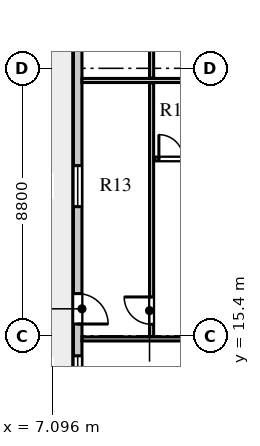
"""IFC4 building model, lengths in metres.
Left out: names, types, materials, properties, quantities, classifications, styles, units other than length and angle.
Written with IfcOpenShell. Run it as: python <this file> out.ifc"""

import sys

from ifc_helpers import new_model, si_unit, direction, frame, frame_2d, origin, place, context, subcontext, project, spatial, rectangle, extrude, element, fill, save


model = new_model("IFC4")
c1 = context("Model", 3, precision=1e-05, world=origin(), true_north=direction((0.0, 1.0)))
c2 = subcontext(c1, "Body", "Model", "MODEL_VIEW")
j1 = project(units=[si_unit("LENGTHUNIT", "METRE"), si_unit("PLANEANGLEUNIT", "RADIAN")], contexts=[c1])
p1 = place(None, origin())
s1 = spatial("IfcSite", under=j1, at=p1, CompositionType="ELEMENT")
p2 = place(p1, origin())
s2 = spatial("IfcBuilding", under=s1, at=p2, CompositionType="ELEMENT")
p3 = place(p2, frame((0.0, 0.0, 229.7)))
s3 = spatial("IfcBuildingStorey", under=s2, at=p3, CompositionType="ELEMENT", Elevation=229.7)
p4 = place(p3, frame((7.94, 44.07, 0.0), z_axis=(0.0, 0.0, 1.0), x_axis=(0.0, -1.0, 0.0)))
e1 = element("IfcWall", 1, at=p4, inside=s3, PredefinedType="STANDARD", context=c2, shape_type="SweptSolid", body=[
    extrude(rectangle(XDim=30.94, YDim=0.28, at=frame_2d((15.47, 0.0))), origin(), (0.0, 0.0, 1.0), 3.66),
])
p5 = place(p4, frame((29.325, 0.0, 0.8)))
e2 = element("IfcOpeningElement", 2, at=p5, cuts=e1, PredefinedType="OPENING", context=c2, shape_type="SweptSolid", body=[
    extrude(rectangle(XDim=0.95, YDim=1.65, at=frame_2d((0.475, 0.825))), frame((0.0, 0.15, 0.0), z_axis=(0.0, -1.0, 0.0), x_axis=(1.0, 0.0, 0.0)), (0.0, 0.0, 1.0), 0.3),
])
p6 = place(p4, frame((27.28, 0.0, 0.0)))
e3 = element("IfcOpeningElement", 3, at=p6, cuts=e1, PredefinedType="OPENING", context=c2, shape_type="SweptSolid", body=[
    extrude(rectangle(XDim=1.0, YDim=2.05, at=frame_2d((0.5, 1.025))), frame((0.0, 0.15, 0.0), z_axis=(0.0, -1.0, 0.0), x_axis=(1.0, 0.0, 0.0)), (0.0, 0.0, 1.0), 0.3),
])
p7 = place(p4, frame((23.07, 0.0, 0.8)))
e4 = element("IfcOpeningElement", 4, at=p7, cuts=e1, PredefinedType="OPENING", context=c2, shape_type="SweptSolid", body=[
    extrude(rectangle(XDim=1.35, YDim=1.9, at=frame_2d((0.675, 0.95))), frame((0.0, 0.15, 0.0), z_axis=(0.0, -1.0, 0.0), x_axis=(1.0, 0.0, 0.0)), (0.0, 0.0, 1.0), 0.3),
])
p8 = place(p4, frame((17.045, 0.0, 0.8)))
e5 = element("IfcOpeningElement", 5, at=p8, cuts=e1, PredefinedType="OPENING", context=c2, shape_type="SweptSolid", body=[
    extrude(rectangle(XDim=1.65, YDim=1.95, at=frame_2d((0.825, 0.975))), frame((0.0, 0.15, 0.0), z_axis=(0.0, -1.0, 0.0), x_axis=(1.0, 0.0, 0.0)), (0.0, 0.0, 1.0), 0.3),
])
p9 = place(p4, frame((12.095, 0.0, 0.8)))
e6 = element("IfcOpeningElement", 6, at=p9, cuts=e1, PredefinedType="OPENING", context=c2, shape_type="SweptSolid", body=[
    extrude(rectangle(XDim=1.95, YDim=2.0, at=frame_2d((0.975, 1.0))), frame((0.0, 0.15, 0.0), z_axis=(0.0, -1.0, 0.0), x_axis=(1.0, 0.0, 0.0)), (0.0, 0.0, 1.0), 0.3),
])
p10 = place(p4, frame((5.295, 0.0, 0.8)))
e7 = element("IfcOpeningElement", 7, at=p10, cuts=e1, PredefinedType="OPENING", context=c2, shape_type="SweptSolid", body=[
    extrude(rectangle(XDim=2.25, YDim=2.0, at=frame_2d((1.125, 1.0))), frame((0.0, 0.15, 0.0), z_axis=(0.0, -1.0, 0.0), x_axis=(1.0, 0.0, 0.0)), (0.0, 0.0, 1.0), 0.3),
])
p11 = place(p4, frame((0.665, 0.0, 0.8)))
e8 = element("IfcOpeningElement", 8, at=p11, cuts=e1, PredefinedType="OPENING", context=c2, shape_type="SweptSolid", body=[
    extrude(rectangle(XDim=0.95, YDim=1.65, at=frame_2d((0.475, 0.825))), frame((0.0, 0.15, 0.0), z_axis=(0.0, -1.0, 0.0), x_axis=(1.0, 0.0, 0.0)), (0.0, 0.0, 1.0), 0.3),
])
p12 = place(p3, frame((8.08, 15.3, 0.0), z_axis=(0.0, 0.0, 1.0), x_axis=(1.0, 0.0, 0.0)))
e9 = element("IfcWall", 9, at=p12, inside=s3, PredefinedType="PARTITIONING", context=c2, shape_type="SweptSolid", body=[
    extrude(rectangle(XDim=5.62, YDim=0.135, at=frame_2d((2.81, 0.0))), origin(), (0.0, 0.0, 1.0), 3.21),
])
p13 = place(p3, frame((10.37, 15.38, 0.0), z_axis=(0.0, 0.0, 1.0), x_axis=(0.0, 1.0, 0.0)))
e10 = element("IfcWall", 10, at=p13, inside=s3, PredefinedType="PARTITIONING", context=c2, shape_type="SweptSolid", body=[
    extrude(rectangle(XDim=8.34, YDim=0.135, at=frame_2d((4.17, 0.0))), origin(), (0.0, 0.0, 1.0), 3.66),
])
p14 = place(p13, frame((0.4, 0.0, 0.0)))
e11 = element("IfcOpeningElement", 11, at=p14, cuts=e10, PredefinedType="OPENING", context=c2, shape_type="SweptSolid", body=[
    extrude(rectangle(XDim=0.9, YDim=2.08, at=frame_2d((0.45, 1.04))), frame((0.0, 0.078, 0.0), z_axis=(0.0, -1.0, 0.0), x_axis=(1.0, 0.0, 0.0)), (0.0, 0.0, 1.0), 0.155),
])
p15 = place(p3, frame((10.45, 21.218, 0.0), z_axis=(0.0, 0.0, 1.0), x_axis=(1.0, 0.0, 0.0)))
e12 = element("IfcWall", 12, at=p15, inside=s3, PredefinedType="PLUMBINGWALL", context=c2, shape_type="SweptSolid", body=[
    extrude(rectangle(XDim=3.17, YDim=0.125, at=frame_2d((1.585, 0.0))), origin(), (0.0, 0.0, 1.0), 3.66),
])
p16 = place(p15, frame((0.16, 0.0, 0.0)))
e13 = element("IfcOpeningElement", 13, at=p16, cuts=e12, PredefinedType="OPENING", context=c2, shape_type="SweptSolid", body=[
    extrude(rectangle(XDim=0.8, YDim=2.05, at=frame_2d((0.4, 1.025))), frame((0.0, 0.073, 0.0), z_axis=(0.0, -1.0, 0.0), x_axis=(1.0, 0.0, 0.0)), (0.0, 0.0, 1.0), 0.145),
])
p17 = place(p15, frame((1.782, 0.0, 0.0)))
e14 = element("IfcOpeningElement", 14, at=p17, cuts=e12, PredefinedType="OPENING", context=c2, shape_type="SweptSolid", body=[
    extrude(rectangle(XDim=0.8, YDim=2.05, at=frame_2d((0.4, 1.025))), frame((0.0, 0.073, 0.0), z_axis=(0.0, -1.0, 0.0), x_axis=(1.0, 0.0, 0.0)), (0.0, 0.0, 1.0), 0.145),
])
p18 = place(p3, frame((8.08, 23.8, 0.0), z_axis=(0.0, 0.0, 1.0), x_axis=(1.0, 0.0, 0.0)))
e15 = element("IfcWall", 15, at=p18, inside=s3, PredefinedType="PARTITIONING", context=c2, shape_type="SweptSolid", body=[
    extrude(rectangle(XDim=5.56, YDim=0.135, at=frame_2d((2.78, 0.0))), origin(), (0.0, 0.0, 1.0), 3.66),
])
p19 = place(p3, frame((10.37, 23.88, 0.0), z_axis=(0.0, 0.0, 1.0), x_axis=(0.0, 1.0, 0.0)))
e16 = element("IfcWall", 16, at=p19, inside=s3, PredefinedType="PARTITIONING", context=c2, shape_type="SweptSolid", body=[
    extrude(rectangle(XDim=9.44, YDim=0.135, at=frame_2d((4.72, 0.0))), origin(), (0.0, 0.0, 1.0), 3.66),
])
p20 = place(p19, frame((3.67, 0.0, 0.0)))
e17 = element("IfcOpeningElement", 17, at=p20, cuts=e16, PredefinedType="OPENING", context=c2, shape_type="SweptSolid", body=[
    extrude(rectangle(XDim=0.85, YDim=2.08, at=frame_2d((0.425, 1.04))), frame((0.0, 0.078, 0.0), z_axis=(0.0, -1.0, 0.0), x_axis=(1.0, 0.0, 0.0)), (0.0, 0.0, 1.0), 0.155),
])
p21 = place(p19, frame((4.97, 0.0, 0.0)))
e18 = element("IfcOpeningElement", 18, at=p21, cuts=e16, PredefinedType="OPENING", context=c2, shape_type="SweptSolid", body=[
    extrude(rectangle(XDim=0.85, YDim=2.08, at=frame_2d((0.425, 1.04))), frame((0.0, 0.078, 0.0), z_axis=(0.0, -1.0, 0.0), x_axis=(1.0, 0.0, 0.0)), (0.0, 0.0, 1.0), 0.155),
])
p22 = place(p5, origin())
e19 = element("IfcWindow", 19, at=p22, inside=s3, PartitioningType="SINGLE_PANEL", PredefinedType="WINDOW", context=c2, shape_type="SweptSolid", body=[
    extrude(rectangle(XDim=0.95, YDim=1.65, at=frame_2d((0.475, 0.825))), frame((0.0, 0.03, 0.0), z_axis=(0.0, -1.0, 0.0), x_axis=(1.0, 0.0, 0.0)), (0.0, 0.0, 1.0), 0.06),
])
fill(e2, e19)
p23 = place(p6, frame((1.0, 0.0, 0.0), z_axis=(0.0, 0.0, 1.0), x_axis=(-1.0, 0.0, 0.0)))
e20 = element("IfcDoor", 20, at=p23, inside=s3, OperationType="SINGLE_SWING_LEFT", PredefinedType="DOOR", context=c2, shape_type="SweptSolid", body=[
    extrude(rectangle(XDim=1.0, YDim=2.05, at=frame_2d((0.5, 1.025))), frame((0.0, 0.025, 0.0), z_axis=(0.0, -1.0, 0.0), x_axis=(1.0, 0.0, 0.0)), (0.0, 0.0, 1.0), 0.05),
])
fill(e3, e20)
p24 = place(p7, origin())
e21 = element("IfcWindow", 21, at=p24, inside=s3, PartitioningType="SINGLE_PANEL", PredefinedType="WINDOW", context=c2, shape_type="SweptSolid", body=[
    extrude(rectangle(XDim=1.35, YDim=1.9, at=frame_2d((0.675, 0.95))), frame((0.0, 0.03, 0.0), z_axis=(0.0, -1.0, 0.0), x_axis=(1.0, 0.0, 0.0)), (0.0, 0.0, 1.0), 0.06),
])
fill(e4, e21)
p25 = place(p16, origin())
e22 = element("IfcDoor", 22, at=p25, inside=s3, OperationType="SINGLE_SWING_LEFT", PredefinedType="DOOR", context=c2, shape_type="SweptSolid", body=[
    extrude(rectangle(XDim=0.8, YDim=2.05, at=frame_2d((0.4, 1.025))), frame((0.0, 0.025, 0.0), z_axis=(0.0, -1.0, 0.0), x_axis=(1.0, 0.0, 0.0)), (0.0, 0.0, 1.0), 0.05),
])
fill(e13, e22)
p26 = place(p14, frame((0.9, 0.0, 0.0), z_axis=(0.0, 0.0, 1.0), x_axis=(-1.0, 0.0, 0.0)))
e23 = element("IfcDoor", 23, at=p26, inside=s3, OperationType="SINGLE_SWING_LEFT", PredefinedType="DOOR", context=c2, shape_type="SweptSolid", body=[
    extrude(rectangle(XDim=0.9, YDim=2.08, at=frame_2d((0.45, 1.04))), frame((0.0, 0.025, 0.0), z_axis=(0.0, -1.0, 0.0), x_axis=(1.0, 0.0, 0.0)), (0.0, 0.0, 1.0), 0.05),
])
fill(e11, e23)
save(model, sys.argv[1])
